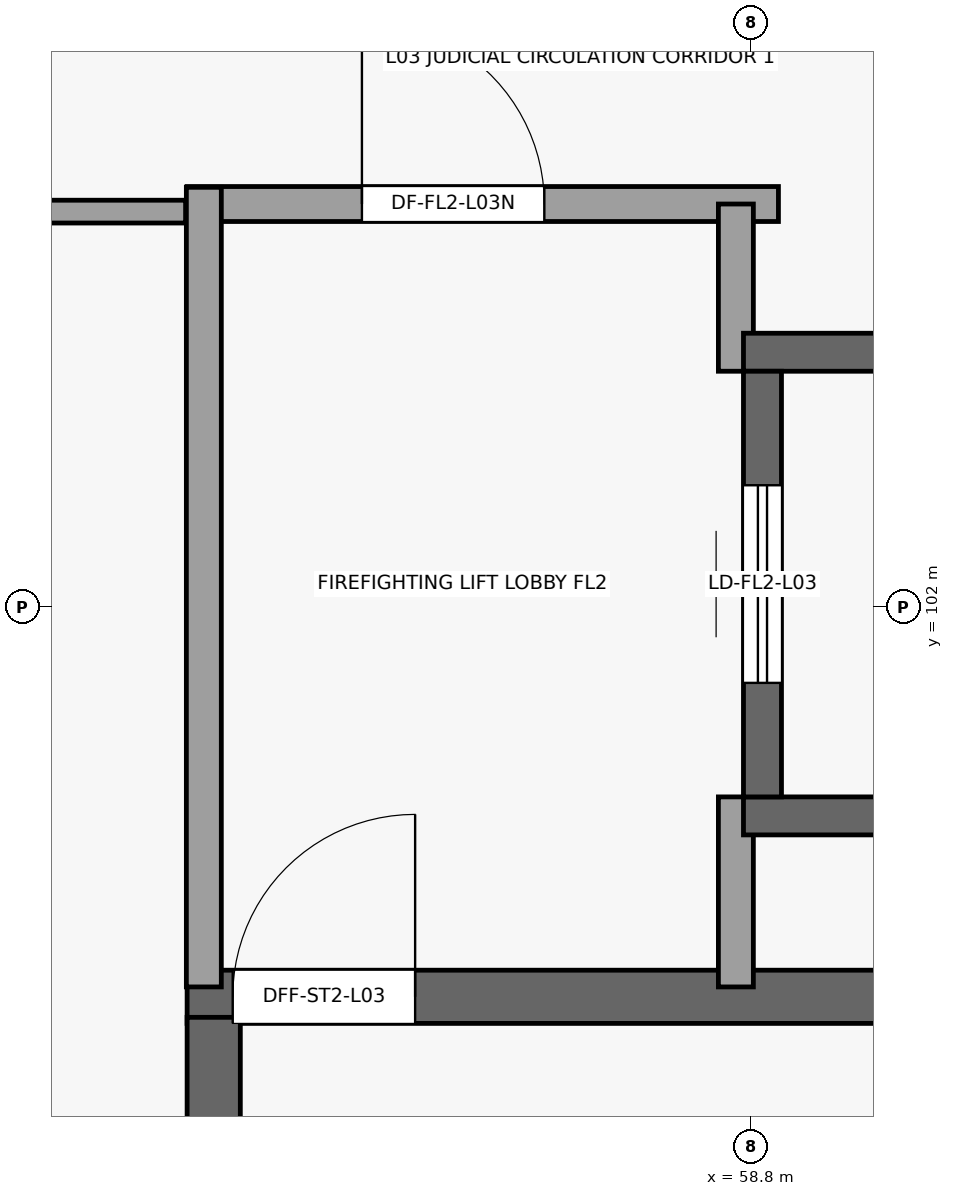
"""IFC4 building model, lengths in metres.
Left out: names, types, materials, properties, quantities, classifications, styles, units other than length and angle.
Written with IfcOpenShell. Run it as: python <this file> out.ifc"""

import sys

from ifc_helpers import new_model, si_unit, direction, frame, frame_2d, origin, place, context, subcontext, project, spatial, rectangle, extrude, element, fill, save


model = new_model("IFC4")
c1 = context("Model", 3, precision=1e-05, world=origin(), true_north=direction((0.0, 1.0)))
c2 = subcontext(c1, "Body", "Model", "MODEL_VIEW")
j1 = project(units=[si_unit("LENGTHUNIT", "METRE"), si_unit("PLANEANGLEUNIT", "RADIAN")], contexts=[c1])
p1 = place(None, origin())
s1 = spatial("IfcSite", under=j1, at=p1, CompositionType="ELEMENT")
p2 = place(p1, origin())
s2 = spatial("IfcBuilding", under=s1, at=p2, CompositionType="ELEMENT")
p3 = place(p2, frame((0.0, 0.0, 10.2)))
s3 = spatial("IfcBuildingStorey", under=s2, at=p3, CompositionType="ELEMENT", Elevation=10.2)
p4 = place(p3, frame((64.31, 99.435, 0.0), z_axis=(0.0, 0.0, 1.0), x_axis=(-1.0, 0.0, 0.0)))
e1 = element("IfcWall", 1, at=p4, inside=s3, PredefinedType="SHEAR", context=c2, shape_type="SweptSolid", body=[
    extrude(rectangle(XDim=9.22, YDim=0.35, at=frame_2d((4.61, 0.0))), origin(), (0.0, 0.0, 1.0), 4.82),
])
p5 = place(p4, frame((7.72, 0.0, 0.0)))
e2 = element("IfcOpeningElement", 2, at=p5, cuts=e1, PredefinedType="OPENING", context=c2, shape_type="SweptSolid", body=[
    extrude(rectangle(XDim=1.2, YDim=2.2, at=frame_2d((0.6, 1.1))), frame((0.0, 0.185, 0.0), z_axis=(0.0, -1.0, 0.0), x_axis=(1.0, 0.0, 0.0)), (0.0, 0.0, 1.0), 0.37),
])
p6 = place(p3, frame((55.265, 95.4, 0.0), z_axis=(0.0, 0.0, 1.0), x_axis=(0.0, 1.0, 0.0)))
e3 = element("IfcWall", 3, at=p6, inside=s3, PredefinedType="SHEAR", context=c2, shape_type="SweptSolid", body=[
    extrude(rectangle(XDim=3.9, YDim=0.35, at=frame_2d((1.95, 0.0))), origin(), (0.0, 0.0, 1.0), 4.82),
])
p7 = place(p3, frame((55.09, 104.65, 0.0), z_axis=(0.0, 0.0, 1.0), x_axis=(1.0, 0.0, 0.0)))
e4 = element("IfcWall", 4, at=p7, inside=s3, PredefinedType="PARTITIONING", context=c2, shape_type="SweptSolid", body=[
    extrude(rectangle(XDim=3.89, YDim=0.23, at=frame_2d((1.945, 0.0))), origin(), (0.0, 0.0, 1.0), 4.82),
])
p8 = place(p7, frame((1.15, 0.0, 0.0)))
e5 = element("IfcOpeningElement", 5, at=p8, cuts=e4, PredefinedType="OPENING", context=c2, shape_type="SweptSolid", body=[
    extrude(rectangle(XDim=1.2, YDim=2.2, at=frame_2d((0.6, 1.1))), frame((0.0, 0.125, 0.0), z_axis=(0.0, -1.0, 0.0), x_axis=(1.0, 0.0, 0.0)), (0.0, 0.0, 1.0), 0.25),
])
p9 = place(p3, frame((55.2, 99.5, 0.0), z_axis=(0.0, 0.0, 1.0), x_axis=(0.0, 1.0, 0.0)))
e6 = element("IfcWall", 6, at=p9, inside=s3, PredefinedType="PARTITIONING", context=c2, shape_type="SweptSolid", body=[
    extrude(rectangle(XDim=5.26, YDim=0.23, at=frame_2d((2.63, 0.0))), origin(), (0.0, 0.0, 1.0), 4.82),
])
p10 = place(p3, frame((58.7, 104.65, 0.0), z_axis=(0.0, 0.0, 1.0), x_axis=(0.0, -1.0, 0.0)))
e7 = element("IfcWall", 7, at=p10, inside=s3, PredefinedType="PARTITIONING", context=c2, shape_type="SweptSolid", body=[
    extrude(rectangle(XDim=1.1, YDim=0.23, at=frame_2d((0.55, 0.0))), origin(), (0.0, 0.0, 1.0), 4.82),
])
p11 = place(p3, frame((58.7, 100.75, 0.0), z_axis=(0.0, 0.0, 1.0), x_axis=(0.0, -1.0, 0.0)))
e8 = element("IfcWall", 8, at=p11, inside=s3, PredefinedType="PARTITIONING", context=c2, shape_type="SweptSolid", body=[
    extrude(rectangle(XDim=1.25, YDim=0.23, at=frame_2d((0.625, 0.0))), origin(), (0.0, 0.0, 1.0), 4.82),
])
for number, where, z_axis, x_axis in (
    (9, (58.75, 100.625, 0.0), (0.0, 0.0, 1.0), (1.0, 0.0, 0.0)),
    (10, (61.45, 103.675, 0.0), (0.0, 0.0, 1.0), (-1.0, 0.0, 0.0)),
):
    element("IfcWall", number, at=place(p3, frame(where, z_axis=z_axis, x_axis=x_axis)), inside=s3, PredefinedType="SHEAR", context=c2, shape_type="SweptSolid", body=[
        extrude(rectangle(XDim=2.7, YDim=0.25, at=frame_2d((1.35, 0.0))), origin(), (0.0, 0.0, 1.0), 4.82),
    ])
p12 = place(p3, frame((58.875, 100.75, 0.0), z_axis=(0.0, 0.0, 1.0), x_axis=(0.0, 1.0, 0.0)))
e11 = element("IfcWall", 11, at=p12, inside=s3, PredefinedType="SHEAR", context=c2, shape_type="SweptSolid", body=[
    extrude(rectangle(XDim=2.8, YDim=0.25, at=frame_2d((1.4, 0.0))), origin(), (0.0, 0.0, 1.0), 4.82),
])
p13 = place(p12, frame((0.75, 0.0, 0.0)))
e12 = element("IfcOpeningElement", 12, at=p13, cuts=e11, PredefinedType="OPENING", context=c2, shape_type="SweptSolid", body=[
    extrude(rectangle(XDim=1.3, YDim=2.25, at=frame_2d((0.65, 1.125))), frame((0.0, 0.135, 0.0), z_axis=(0.0, -1.0, 0.0), x_axis=(1.0, 0.0, 0.0)), (0.0, 0.0, 1.0), 0.27),
])
p14 = place(p3, frame((52.505, 104.6, 0.0), z_axis=(0.0, 0.0, 1.0), x_axis=(1.0, 0.0, 0.0)))
e13 = element("IfcWall", 13, at=p14, inside=s3, PredefinedType="PARTITIONING", context=c2, shape_type="SweptSolid", body=[
    extrude(rectangle(XDim=2.575, YDim=0.15, at=frame_2d((1.288, 0.0))), origin(), (0.0, 0.0, 1.0), 4.82),
])
p15 = place(p5, origin())
e14 = element("IfcDoor", 14, at=p15, inside=s3, OperationType="SINGLE_SWING_RIGHT", PredefinedType="DOOR", context=c2, shape_type="SweptSolid", body=[
    extrude(rectangle(XDim=1.2, YDim=2.2, at=frame_2d((0.6, 1.1))), frame((0.0, 0.025, 0.0), z_axis=(0.0, -1.0, 0.0), x_axis=(1.0, 0.0, 0.0)), (0.0, 0.0, 1.0), 0.05),
])
fill(e2, e14)
p16 = place(p8, origin())
e15 = element("IfcDoor", 15, at=p16, inside=s3, OperationType="SINGLE_SWING_LEFT", PredefinedType="DOOR", context=c2, shape_type="SweptSolid", body=[
    extrude(rectangle(XDim=1.2, YDim=2.2, at=frame_2d((0.6, 1.1))), frame((0.0, 0.025, 0.0), z_axis=(0.0, -1.0, 0.0), x_axis=(1.0, 0.0, 0.0)), (0.0, 0.0, 1.0), 0.05),
])
fill(e5, e15)
p17 = place(p13, origin())
e16 = element("IfcDoor", 16, at=p17, inside=s3, OperationType="SLIDING_TO_RIGHT", PredefinedType="DOOR", context=c2, shape_type="SweptSolid", body=[
    extrude(rectangle(XDim=1.3, YDim=2.25, at=frame_2d((0.65, 1.125))), frame((0.0, 0.025, 0.0), z_axis=(0.0, -1.0, 0.0), x_axis=(1.0, 0.0, 0.0)), (0.0, 0.0, 1.0), 0.05),
])
fill(e12, e16)
save(model, sys.argv[1])
